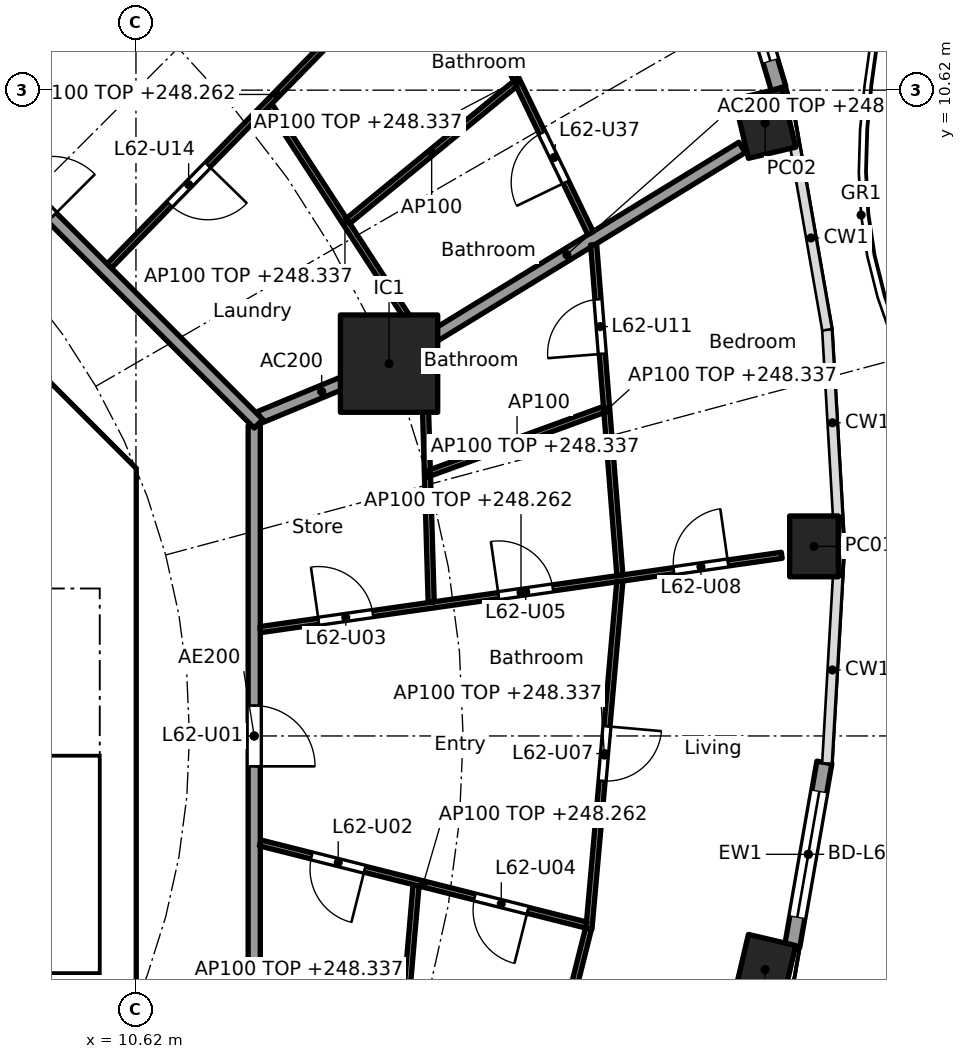
"""IFC4 building model, lengths in metres.
Left out: names, types, materials, properties, quantities, classifications, styles, units other than length and angle.
Written with IfcOpenShell. Run it as: python <this file> out.ifc"""

import sys

from ifc_helpers import new_model, si_unit, direction, frame, frame_2d, origin, origin_2d, place, context, subcontext, project, spatial, polyline, rectangle, hollow_rectangle, outline, extrude, element, fill, save


model = new_model("IFC4")
c1 = context("Model", 3, precision=1e-05, world=origin(), true_north=direction((0.0, 1.0)))
c2 = subcontext(c1, "Body", "Model", "MODEL_VIEW")
j1 = project(units=[si_unit("LENGTHUNIT", "METRE"), si_unit("PLANEANGLEUNIT", "RADIAN")], contexts=[c1])
p1 = place(None, origin())
s1 = spatial("IfcSite", under=j1, at=p1, CompositionType="ELEMENT")
p2 = place(p1, origin())
s2 = spatial("IfcBuilding", under=s1, at=p2, CompositionType="ELEMENT")
p3 = place(p2, frame((0.0, 0.0, 245.5)))
s3 = spatial("IfcBuildingStorey", under=s2, at=p3, CompositionType="ELEMENT", Elevation=245.5)
for number, where, z_axis, x_axis in (
    (1, (21.77, 3.118, 0.0), (0.0, 0.0, 1.0), (0.0, 1.0, 0.0)),
    (2, (20.967, 10.077, 0.0), (0.0, 0.0, 1.0), (-0.229, 0.973, 0.0)),
    (3, (20.967, -3.842, 0.0), (0.0, 0.0, 1.0), (0.229, 0.973, 0.0)),
):
    element("IfcColumn", number, at=place(p3, frame(where, z_axis=z_axis, x_axis=x_axis)), inside=s3, PredefinedType="COLUMN", context=c2, shape_type="SweptSolid", body=[
        extrude(hollow_rectangle(XDim=1.0, YDim=0.8, WallThickness=0.032, at=origin_2d()), origin(), (0.0, 0.0, 1.0), 3.7),
    ])
p4 = place(p3, frame((14.782, 6.123, 0.0), z_axis=(0.0, 0.0, 1.0), x_axis=(1.0, 0.0, 0.0)))
e4 = element("IfcColumn", 4, at=p4, inside=s3, PredefinedType="COLUMN", context=c2, shape_type="SweptSolid", body=[
    extrude(rectangle(XDim=1.6, YDim=1.6, at=origin_2d()), origin(), (0.0, 0.0, 1.0), 3.7),
])
p5 = place(p3, frame((20.318, 13.564, 0.0), z_axis=(0.0, 0.0, 1.0), x_axis=(0.285785716255, -0.958293548128, 0.0)))
e5 = element("IfcWall", 5, at=p5, inside=s3, PredefinedType="SOLIDWALL", context=c2, shape_type="SweptSolid", body=[
    extrude(rectangle(XDim=3.04, YDim=0.25, at=frame_2d((1.52, 0.0))), origin(), (0.0, 0.0, 1.0), 3.44),
])
p6 = place(p5, frame((0.47, 0.0, 0.0)))
e6 = element("IfcOpeningElement", 6, at=p6, cuts=e5, PredefinedType="OPENING", context=c2, shape_type="SweptSolid", body=[
    extrude(rectangle(XDim=2.1, YDim=2.4, at=frame_2d((1.05, 1.2))), frame((0.0, 0.135, 0.0), z_axis=(0.0, -1.0, 0.0), x_axis=(1.0, 0.0, 0.0)), (0.0, 0.0, 1.0), 0.27),
])
p7 = place(p3, frame((21.941, -0.436, 0.0), z_axis=(0.0, 0.0, 1.0), x_axis=(-0.172164083933, -0.985068286061, 0.0)))
e7 = element("IfcWall", 7, at=p7, inside=s3, PredefinedType="SOLIDWALL", context=c2, shape_type="SweptSolid", body=[
    extrude(rectangle(XDim=3.067, YDim=0.25, at=frame_2d((1.534, 0.0))), origin(), (0.0, 0.0, 1.0), 3.44),
])
p8 = place(p7, frame((0.484, 0.0, 0.0)))
e8 = element("IfcOpeningElement", 8, at=p8, cuts=e7, PredefinedType="OPENING", context=c2, shape_type="SweptSolid", body=[
    extrude(rectangle(XDim=2.1, YDim=2.4, at=frame_2d((1.05, 1.2))), frame((0.0, 0.135, 0.0), z_axis=(0.0, -1.0, 0.0), x_axis=(1.0, 0.0, 0.0)), (0.0, 0.0, 1.0), 0.27),
])
p9 = place(p3, frame((9.988, 4.613, 0.0), z_axis=(0.0, 0.0, 1.0), x_axis=(-0.707106781187, 0.707106781187, 0.0)))
e9 = element("IfcWall", 9, at=p9, inside=s3, PredefinedType="SHEAR", context=c2, shape_type="SweptSolid", body=[
    extrude(rectangle(XDim=7.602, YDim=0.6, at=frame_2d((3.801, 0.0))), origin(), (0.0, 0.0, 1.0), 3.44),
])
p10 = place(p9, frame((3.201, 0.0, 0.0)))
e10 = element("IfcOpeningElement", 10, at=p10, cuts=e9, PredefinedType="OPENING", context=c2, shape_type="SweptSolid", body=[
    extrude(rectangle(XDim=1.2, YDim=2.1, at=frame_2d((0.6, 1.05))), frame((0.0, 0.31, 0.0), z_axis=(0.0, -1.0, 0.0), x_axis=(1.0, 0.0, 0.0)), (0.0, 0.0, 1.0), 0.62),
])
p11 = place(p3, frame((6.7, 4.0, 0.0), z_axis=(0.0, 0.0, 1.0), x_axis=(1.0, 0.0, 0.0)))
e11 = element("IfcWall", 11, at=p11, inside=s3, PredefinedType="SOLIDWALL", context=c2, shape_type="SweptSolid", body=[
    extrude(rectangle(XDim=3.325, YDim=0.2, at=frame_2d((1.662, 0.0))), origin(), (0.0, 0.0, 1.0), 3.44),
])
p12 = place(p11, frame((1.25, 0.0, 0.0)))
e12 = element("IfcOpeningElement", 12, at=p12, cuts=e11, PredefinedType="OPENING", context=c2, shape_type="SweptSolid", body=[
    extrude(rectangle(XDim=1.1, YDim=2.1, at=frame_2d((0.55, 1.05))), frame((0.0, 0.11, 0.0), z_axis=(0.0, -1.0, 0.0), x_axis=(1.0, 0.0, 0.0)), (0.0, 0.0, 1.0), 0.22),
])
p13 = place(p3, origin())
e13 = element("IfcWall", 13, at=p13, inside=s3, PredefinedType="SHEAR", context=c2, shape_type="SweptSolid", body=[
    extrude(outline(polyline([(9.776, -4.401), (10.025, -4.152), (10.025, -3.801), (10.025, 4.152), (9.776, 4.401), (10.2, 4.825), (10.625, 4.401), (10.625, -4.401), (10.2, -4.825), (9.776, -4.401)])), origin(), (0.0, 0.0, 1.0), 3.44),
])
p14 = place(p3, origin())
e14 = element("IfcWall", 14, at=p14, inside=s3, PredefinedType="SOLIDWALL", context=c2, shape_type="SweptSolid", body=[
    extrude(outline(polyline([(10.025, -4.1), (6.7, -4.1), (6.7, -3.9), (10.025, -3.9), (10.025, -4.1)])), origin(), (0.0, 0.0, 1.0), 3.44),
])
p15 = place(p3, frame((12.657, 5.243, 0.0), z_axis=(0.0, 0.0, 1.0), x_axis=(0.92383017907, 0.382802560388, 0.0)))
e15 = element("IfcWall", 15, at=p15, inside=s3, PredefinedType="PARTITIONING", context=c2, shape_type="SweptSolid", body=[
    extrude(rectangle(XDim=2.2, YDim=0.2, at=frame_2d((1.1, 0.0))), origin(), (0.0, 0.0, 1.0), 3.44),
])
p16 = place(p3, frame((14.825, 6.149, 0.0), z_axis=(0.0, 0.0, 1.0), x_axis=(0.852781365284, 0.522268075824, 0.0)))
e16 = element("IfcWall", 16, at=p16, inside=s3, PredefinedType="PARTITIONING", context=c2, shape_type="SweptSolid", body=[
    extrude(rectangle(XDim=6.758, YDim=0.2, at=frame_2d((3.379, 0.0))), origin(), (0.0, 0.0, 1.0), 2.837),
])
p17 = place(p3, frame((12.565, -5.104, 0.0), z_axis=(0.0, 0.0, 1.0), x_axis=(0.0, 1.0, 0.0)))
e17 = element("IfcWall", 17, at=p17, inside=s3, PredefinedType="PARTITIONING", context=c2, shape_type="SweptSolid", body=[
    extrude(rectangle(XDim=10.209, YDim=0.2, at=frame_2d((5.104, 0.0))), origin(), (0.0, 0.0, 1.0), 3.44),
])
p18 = place(p17, frame((4.604, 0.0, 0.0)))
e18 = element("IfcOpeningElement", 18, at=p18, cuts=e17, PredefinedType="OPENING", context=c2, shape_type="SweptSolid", body=[
    extrude(rectangle(XDim=1.0, YDim=2.1, at=frame_2d((0.5, 1.05))), frame((0.0, 0.11, 0.0), z_axis=(0.0, -1.0, 0.0), x_axis=(1.0, 0.0, 0.0)), (0.0, 0.0, 1.0), 0.22),
])
p19 = place(p3, frame((12.635, 5.134, 0.0), z_axis=(0.0, 0.0, 1.0), x_axis=(-0.707106781187, 0.707106781187, 0.0)))
e19 = element("IfcWall", 19, at=p19, inside=s3, PredefinedType="PARTITIONING", context=c2, shape_type="SweptSolid", body=[
    extrude(rectangle(XDim=10.609, YDim=0.2, at=frame_2d((5.305, 0.0))), origin(), (0.0, 0.0, 1.0), 3.44),
])
p20 = place(p19, frame((4.804, 0.0, 0.0)))
e20 = element("IfcOpeningElement", 20, at=p20, cuts=e19, PredefinedType="OPENING", context=c2, shape_type="SweptSolid", body=[
    extrude(rectangle(XDim=1.0, YDim=2.1, at=frame_2d((0.5, 1.05))), frame((0.0, 0.11, 0.0), z_axis=(0.0, -1.0, 0.0), x_axis=(1.0, 0.0, 0.0)), (0.0, 0.0, 1.0), 0.22),
])
p21 = place(p3, frame((12.664, 1.749, 0.0), z_axis=(0.0, 0.0, 1.0), x_axis=(0.990001845476, 0.141054407783, 0.0)))
e21 = element("IfcWall", 21, at=p21, inside=s3, PredefinedType="PARTITIONING", context=c2, shape_type="SweptSolid", body=[
    extrude(rectangle(XDim=8.663, YDim=0.1, at=frame_2d((4.332, 0.0))), origin(), (0.0, 0.0, 1.0), 2.762),
])
p22 = place(p21, frame((0.97, 0.0, 0.0)))
e22 = element("IfcOpeningElement", 22, at=p22, cuts=e21, PredefinedType="OPENING", context=c2, shape_type="SweptSolid", body=[
    extrude(rectangle(XDim=0.9, YDim=2.1, at=frame_2d((0.45, 1.05))), frame((0.0, 0.06, 0.0), z_axis=(0.0, -1.0, 0.0), x_axis=(1.0, 0.0, 0.0)), (0.0, 0.0, 1.0), 0.12),
])
p23 = place(p21, frame((3.959, 0.0, 0.0)))
e23 = element("IfcOpeningElement", 23, at=p23, cuts=e21, PredefinedType="OPENING", context=c2, shape_type="SweptSolid", body=[
    extrude(rectangle(XDim=0.9, YDim=2.1, at=frame_2d((0.45, 1.05))), frame((0.0, 0.06, 0.0), z_axis=(0.0, -1.0, 0.0), x_axis=(1.0, 0.0, 0.0)), (0.0, 0.0, 1.0), 0.12),
])
p24 = place(p21, frame((6.87, 0.0, 0.0)))
e24 = element("IfcOpeningElement", 24, at=p24, cuts=e21, PredefinedType="OPENING", context=c2, shape_type="SweptSolid", body=[
    extrude(rectangle(XDim=0.9, YDim=2.1, at=frame_2d((0.45, 1.05))), frame((0.0, 0.06, 0.0), z_axis=(0.0, -1.0, 0.0), x_axis=(1.0, 0.0, 0.0)), (0.0, 0.0, 1.0), 0.12),
])
p25 = place(p3, frame((15.475, 2.2, 0.0), z_axis=(0.0, 0.0, 1.0), x_axis=(-0.029254623973, 0.999571991893, 0.0)))
e25 = element("IfcWall", 25, at=p25, inside=s3, PredefinedType="PARTITIONING", context=c2, shape_type="SweptSolid", body=[
    extrude(rectangle(XDim=4.173, YDim=0.1, at=frame_2d((2.086, 0.0))), origin(), (0.0, 0.0, 1.0), 2.837),
])
p26 = place(p3, frame((18.578, 2.642, 0.0), z_axis=(0.0, 0.0, 1.0), x_axis=(-0.079188322924, 0.996859673932, 0.0)))
e26 = element("IfcWall", 26, at=p26, inside=s3, PredefinedType="PARTITIONING", context=c2, shape_type="SweptSolid", body=[
    extrude(rectangle(XDim=5.454, YDim=0.1, at=frame_2d((2.727, 0.0))), origin(), (0.0, 0.0, 1.0), 2.837),
])
p27 = place(p26, frame((3.653, 0.0, 0.0)))
e27 = element("IfcOpeningElement", 27, at=p27, cuts=e26, PredefinedType="OPENING", context=c2, shape_type="SweptSolid", body=[
    extrude(rectangle(XDim=0.9, YDim=2.1, at=frame_2d((0.45, 1.05))), frame((0.0, 0.06, 0.0), z_axis=(0.0, -1.0, 0.0), x_axis=(1.0, 0.0, 0.0)), (0.0, 0.0, 1.0), 0.12),
])
p28 = place(p3, frame((18.578, 2.542, 0.0), z_axis=(0.0, 0.0, 1.0), x_axis=(-0.088651453697, -0.996062708748, 0.0)))
e28 = element("IfcWall", 28, at=p28, inside=s3, PredefinedType="PARTITIONING", context=c2, shape_type="SweptSolid", body=[
    extrude(rectangle(XDim=5.737, YDim=0.1, at=frame_2d((2.868, 0.0))), origin(), (0.0, 0.0, 1.0), 2.837),
])
p29 = place(p28, frame((2.393, 0.0, 0.0)))
e29 = element("IfcOpeningElement", 29, at=p29, cuts=e28, PredefinedType="OPENING", context=c2, shape_type="SweptSolid", body=[
    extrude(rectangle(XDim=0.9, YDim=2.1, at=frame_2d((0.45, 1.05))), frame((0.0, 0.06, 0.0), z_axis=(0.0, -1.0, 0.0), x_axis=(1.0, 0.0, 0.0)), (0.0, 0.0, 1.0), 0.12),
])
p30 = place(p3, frame((15.46, 4.327, 0.0), z_axis=(0.0, 0.0, 1.0), x_axis=(0.939452643938, 0.342678755977, 0.0)))
e30 = element("IfcWall", 30, at=p30, inside=s3, PredefinedType="PARTITIONING", context=c2, shape_type="SweptSolid", body=[
    extrude(rectangle(XDim=3.037, YDim=0.1, at=frame_2d((1.519, 0.0))), origin(), (0.0, 0.0, 1.0), 3.44),
])
p31 = place(p3, frame((15.295, 6.554, 0.0), z_axis=(0.0, 0.0, 1.0), x_axis=(-0.545150807833, 0.838337996705, 0.0)))
e31 = element("IfcWall", 31, at=p31, inside=s3, PredefinedType="PARTITIONING", context=c2, shape_type="SweptSolid", body=[
    extrude(rectangle(XDim=4.542, YDim=0.1, at=frame_2d((2.271, 0.0))), origin(), (0.0, 0.0, 1.0), 2.837),
])
p32 = place(p3, frame((18.095, 8.269, 0.0), z_axis=(0.0, 0.0, 1.0), x_axis=(-0.434643729881, 0.900602480607, 0.0)))
e32 = element("IfcWall", 32, at=p32, inside=s3, PredefinedType="PARTITIONING", context=c2, shape_type="SweptSolid", body=[
    extrude(rectangle(XDim=5.574, YDim=0.1, at=frame_2d((2.787, 0.0))), origin(), (0.0, 0.0, 1.0), 2.837),
])
p33 = place(p32, frame((0.931, 0.0, 0.0)))
e33 = element("IfcOpeningElement", 33, at=p33, cuts=e32, PredefinedType="OPENING", context=c2, shape_type="SweptSolid", body=[
    extrude(rectangle(XDim=0.9, YDim=2.1, at=frame_2d((0.45, 1.05))), frame((0.0, 0.06, 0.0), z_axis=(0.0, -1.0, 0.0), x_axis=(1.0, 0.0, 0.0)), (0.0, 0.0, 1.0), 0.12),
])
p34 = place(p3, frame((14.109, 8.469, 0.0), z_axis=(0.0, 0.0, 1.0), x_axis=(0.772802064515, 0.634647121699, 0.0)))
e34 = element("IfcWall", 34, at=p34, inside=s3, PredefinedType="PARTITIONING", context=c2, shape_type="SweptSolid", body=[
    extrude(rectangle(XDim=3.554, YDim=0.1, at=frame_2d((1.777, 0.0))), origin(), (0.0, 0.0, 1.0), 3.44),
])
p35 = place(p3, frame((10.181, 7.729, 0.0), z_axis=(0.0, 0.0, 1.0), x_axis=(0.698426432281, 0.715681855779, 0.0)))
e35 = element("IfcWall", 35, at=p35, inside=s3, PredefinedType="PARTITIONING", context=c2, shape_type="SweptSolid", body=[
    extrude(rectangle(XDim=7.881, YDim=0.1, at=frame_2d((3.94, 0.0))), origin(), (0.0, 0.0, 1.0), 2.762),
])
p36 = place(p35, frame((1.419, 0.0, 0.0)))
e36 = element("IfcOpeningElement", 36, at=p36, cuts=e35, PredefinedType="OPENING", context=c2, shape_type="SweptSolid", body=[
    extrude(rectangle(XDim=0.9, YDim=2.1, at=frame_2d((0.45, 1.05))), frame((0.0, 0.06, 0.0), z_axis=(0.0, -1.0, 0.0), x_axis=(1.0, 0.0, 0.0)), (0.0, 0.0, 1.0), 0.12),
])
p37 = place(p35, frame((5.334, 0.0, 0.0)))
e37 = element("IfcOpeningElement", 37, at=p37, cuts=e35, PredefinedType="OPENING", context=c2, shape_type="SweptSolid", body=[
    extrude(rectangle(XDim=0.9, YDim=2.1, at=frame_2d((0.45, 1.05))), frame((0.0, 0.06, 0.0), z_axis=(0.0, -1.0, 0.0), x_axis=(1.0, 0.0, 0.0)), (0.0, 0.0, 1.0), 0.12),
])
p38 = place(p3, frame((7.71, 10.197, 0.0), z_axis=(0.0, 0.0, 1.0), x_axis=(0.521477621335, 0.853264959111, 0.0)))
e38 = element("IfcWall", 38, at=p38, inside=s3, PredefinedType="PARTITIONING", context=c2, shape_type="SweptSolid", body=[
    extrude(rectangle(XDim=8.941, YDim=0.1, at=frame_2d((4.471, 0.0))), origin(), (0.0, 0.0, 1.0), 2.762),
])
p39 = place(p38, frame((1.675, 0.0, 0.0)))
e39 = element("IfcOpeningElement", 39, at=p39, cuts=e38, PredefinedType="OPENING", context=c2, shape_type="SweptSolid", body=[
    extrude(rectangle(XDim=0.9, YDim=2.1, at=frame_2d((0.45, 1.05))), frame((0.0, 0.06, 0.0), z_axis=(0.0, -1.0, 0.0), x_axis=(1.0, 0.0, 0.0)), (0.0, 0.0, 1.0), 0.12),
])
p40 = place(p38, frame((6.121, 0.0, 0.0)))
e40 = element("IfcOpeningElement", 40, at=p40, cuts=e38, PredefinedType="OPENING", context=c2, shape_type="SweptSolid", body=[
    extrude(rectangle(XDim=0.9, YDim=2.1, at=frame_2d((0.45, 1.05))), frame((0.0, 0.06, 0.0), z_axis=(0.0, -1.0, 0.0), x_axis=(1.0, 0.0, 0.0)), (0.0, 0.0, 1.0), 0.12),
])
p41 = place(p3, frame((14.904, -6.196, 0.0), z_axis=(0.0, 0.0, 1.0), x_axis=(0.085843822439, 0.996308605879, 0.0)))
e41 = element("IfcWall", 41, at=p41, inside=s3, PredefinedType="PARTITIONING", context=c2, shape_type="SweptSolid", body=[
    extrude(rectangle(XDim=3.754, YDim=0.1, at=frame_2d((1.877, 0.0))), origin(), (0.0, 0.0, 1.0), 2.837),
])
p42 = place(p3, frame((16.807, -8.177, 0.0), z_axis=(0.0, 0.0, 1.0), x_axis=(0.243002985225, 0.970025540474, 0.0)))
e42 = element("IfcWall", 42, at=p42, inside=s3, PredefinedType="PARTITIONING", context=c2, shape_type="SweptSolid", body=[
    extrude(rectangle(XDim=5.162, YDim=0.1, at=frame_2d((2.581, 0.0))), origin(), (0.0, 0.0, 1.0), 2.837),
])
p43 = place(p3, frame((12.662, -1.759, 0.0), z_axis=(0.0, 0.0, 1.0), x_axis=(0.969746519828, -0.24411408661, 0.0)))
e43 = element("IfcWall", 43, at=p43, inside=s3, PredefinedType="PARTITIONING", context=c2, shape_type="SweptSolid", body=[
    extrude(rectangle(XDim=5.531, YDim=0.1, at=frame_2d((2.765, 0.0))), origin(), (0.0, 0.0, 1.0), 2.762),
])
p44 = place(p43, frame((0.874, 0.0, 0.0)))
e44 = element("IfcOpeningElement", 44, at=p44, cuts=e43, PredefinedType="OPENING", context=c2, shape_type="SweptSolid", body=[
    extrude(rectangle(XDim=0.9, YDim=2.1, at=frame_2d((0.45, 1.05))), frame((0.0, 0.06, 0.0), z_axis=(0.0, -1.0, 0.0), x_axis=(1.0, 0.0, 0.0)), (0.0, 0.0, 1.0), 0.12),
])
p45 = place(p43, frame((3.64, 0.0, 0.0)))
e45 = element("IfcOpeningElement", 45, at=p45, cuts=e43, PredefinedType="OPENING", context=c2, shape_type="SweptSolid", body=[
    extrude(rectangle(XDim=0.9, YDim=2.1, at=frame_2d((0.45, 1.05))), frame((0.0, 0.06, 0.0), z_axis=(0.0, -1.0, 0.0), x_axis=(1.0, 0.0, 0.0)), (0.0, 0.0, 1.0), 0.12),
])
p46 = place(p6, origin())
e46 = element("IfcDoor", 46, at=p46, inside=s3, OperationType="SLIDING_TO_LEFT", PredefinedType="DOOR", context=c2, shape_type="SweptSolid", body=[
    extrude(rectangle(XDim=2.1, YDim=2.4, at=frame_2d((1.05, 1.2))), frame((0.0, 0.025, 0.0), z_axis=(0.0, -1.0, 0.0), x_axis=(1.0, 0.0, 0.0)), (0.0, 0.0, 1.0), 0.05),
])
fill(e6, e46)
p47 = place(p8, origin())
e47 = element("IfcDoor", 47, at=p47, inside=s3, OperationType="SLIDING_TO_LEFT", PredefinedType="DOOR", context=c2, shape_type="SweptSolid", body=[
    extrude(rectangle(XDim=2.1, YDim=2.4, at=frame_2d((1.05, 1.2))), frame((0.0, 0.025, 0.0), z_axis=(0.0, -1.0, 0.0), x_axis=(1.0, 0.0, 0.0)), (0.0, 0.0, 1.0), 0.05),
])
fill(e8, e47)
p48 = place(p18, frame((1.0, 0.0, 0.0), x_axis=(-1.0, 0.0, 0.0)))
e48 = element("IfcDoor", 48, at=p48, inside=s3, OperationType="SINGLE_SWING_RIGHT", PredefinedType="DOOR", context=c2, shape_type="SweptSolid", body=[
    extrude(rectangle(XDim=1.0, YDim=2.1, at=frame_2d((0.5, 1.05))), frame((0.0, 0.025, 0.0), z_axis=(0.0, -1.0, 0.0), x_axis=(1.0, 0.0, 0.0)), (0.0, 0.0, 1.0), 0.05),
])
fill(e18, e48)
p49 = place(p44, frame((0.9, 0.0, 0.0), x_axis=(-1.0, 0.0, 0.0)))
e49 = element("IfcDoor", 49, at=p49, inside=s3, OperationType="SINGLE_SWING_LEFT", PredefinedType="DOOR", context=c2, shape_type="SweptSolid", body=[
    extrude(rectangle(XDim=0.9, YDim=2.1, at=frame_2d((0.45, 1.05))), frame((0.0, 0.025, 0.0), z_axis=(0.0, -1.0, 0.0), x_axis=(1.0, 0.0, 0.0)), (0.0, 0.0, 1.0), 0.05),
])
fill(e44, e49)
p50 = place(p22, origin())
e50 = element("IfcDoor", 50, at=p50, inside=s3, OperationType="SINGLE_SWING_LEFT", PredefinedType="DOOR", context=c2, shape_type="SweptSolid", body=[
    extrude(rectangle(XDim=0.9, YDim=2.1, at=frame_2d((0.45, 1.05))), frame((0.0, 0.025, 0.0), z_axis=(0.0, -1.0, 0.0), x_axis=(1.0, 0.0, 0.0)), (0.0, 0.0, 1.0), 0.05),
])
fill(e22, e50)
p51 = place(p45, frame((0.9, 0.0, 0.0), x_axis=(-1.0, 0.0, 0.0)))
e51 = element("IfcDoor", 51, at=p51, inside=s3, OperationType="SINGLE_SWING_LEFT", PredefinedType="DOOR", context=c2, shape_type="SweptSolid", body=[
    extrude(rectangle(XDim=0.9, YDim=2.1, at=frame_2d((0.45, 1.05))), frame((0.0, 0.025, 0.0), z_axis=(0.0, -1.0, 0.0), x_axis=(1.0, 0.0, 0.0)), (0.0, 0.0, 1.0), 0.05),
])
fill(e45, e51)
p52 = place(p23, origin())
e52 = element("IfcDoor", 52, at=p52, inside=s3, OperationType="SINGLE_SWING_LEFT", PredefinedType="DOOR", context=c2, shape_type="SweptSolid", body=[
    extrude(rectangle(XDim=0.9, YDim=2.1, at=frame_2d((0.45, 1.05))), frame((0.0, 0.025, 0.0), z_axis=(0.0, -1.0, 0.0), x_axis=(1.0, 0.0, 0.0)), (0.0, 0.0, 1.0), 0.05),
])
fill(e23, e52)
p53 = place(p29, origin())
e53 = element("IfcDoor", 53, at=p53, inside=s3, OperationType="SINGLE_SWING_LEFT", PredefinedType="DOOR", context=c2, shape_type="SweptSolid", body=[
    extrude(rectangle(XDim=0.9, YDim=2.1, at=frame_2d((0.45, 1.05))), frame((0.0, 0.025, 0.0), z_axis=(0.0, -1.0, 0.0), x_axis=(1.0, 0.0, 0.0)), (0.0, 0.0, 1.0), 0.05),
])
fill(e29, e53)
p54 = place(p24, origin())
e54 = element("IfcDoor", 54, at=p54, inside=s3, OperationType="SINGLE_SWING_RIGHT", PredefinedType="DOOR", context=c2, shape_type="SweptSolid", body=[
    extrude(rectangle(XDim=0.9, YDim=2.1, at=frame_2d((0.45, 1.05))), frame((0.0, 0.025, 0.0), z_axis=(0.0, -1.0, 0.0), x_axis=(1.0, 0.0, 0.0)), (0.0, 0.0, 1.0), 0.05),
])
fill(e24, e54)
p55 = place(p27, origin())
e55 = element("IfcDoor", 55, at=p55, inside=s3, OperationType="SINGLE_SWING_LEFT", PredefinedType="DOOR", context=c2, shape_type="SweptSolid", body=[
    extrude(rectangle(XDim=0.9, YDim=2.1, at=frame_2d((0.45, 1.05))), frame((0.0, 0.025, 0.0), z_axis=(0.0, -1.0, 0.0), x_axis=(1.0, 0.0, 0.0)), (0.0, 0.0, 1.0), 0.05),
])
fill(e27, e55)
p56 = place(p20, frame((1.0, 0.0, 0.0), x_axis=(-1.0, 0.0, 0.0)))
e56 = element("IfcDoor", 56, at=p56, inside=s3, OperationType="SINGLE_SWING_RIGHT", PredefinedType="DOOR", context=c2, shape_type="SweptSolid", body=[
    extrude(rectangle(XDim=1.0, YDim=2.1, at=frame_2d((0.5, 1.05))), frame((0.0, 0.025, 0.0), z_axis=(0.0, -1.0, 0.0), x_axis=(1.0, 0.0, 0.0)), (0.0, 0.0, 1.0), 0.05),
])
fill(e20, e56)
p57 = place(p36, frame((0.9, 0.0, 0.0), x_axis=(-1.0, 0.0, 0.0)))
e57 = element("IfcDoor", 57, at=p57, inside=s3, OperationType="SINGLE_SWING_LEFT", PredefinedType="DOOR", context=c2, shape_type="SweptSolid", body=[
    extrude(rectangle(XDim=0.9, YDim=2.1, at=frame_2d((0.45, 1.05))), frame((0.0, 0.025, 0.0), z_axis=(0.0, -1.0, 0.0), x_axis=(1.0, 0.0, 0.0)), (0.0, 0.0, 1.0), 0.05),
])
fill(e36, e57)
p58 = place(p33, origin())
e58 = element("IfcDoor", 58, at=p58, inside=s3, OperationType="SINGLE_SWING_LEFT", PredefinedType="DOOR", context=c2, shape_type="SweptSolid", body=[
    extrude(rectangle(XDim=0.9, YDim=2.1, at=frame_2d((0.45, 1.05))), frame((0.0, 0.025, 0.0), z_axis=(0.0, -1.0, 0.0), x_axis=(1.0, 0.0, 0.0)), (0.0, 0.0, 1.0), 0.05),
])
fill(e33, e58)
save(model, sys.argv[1])
